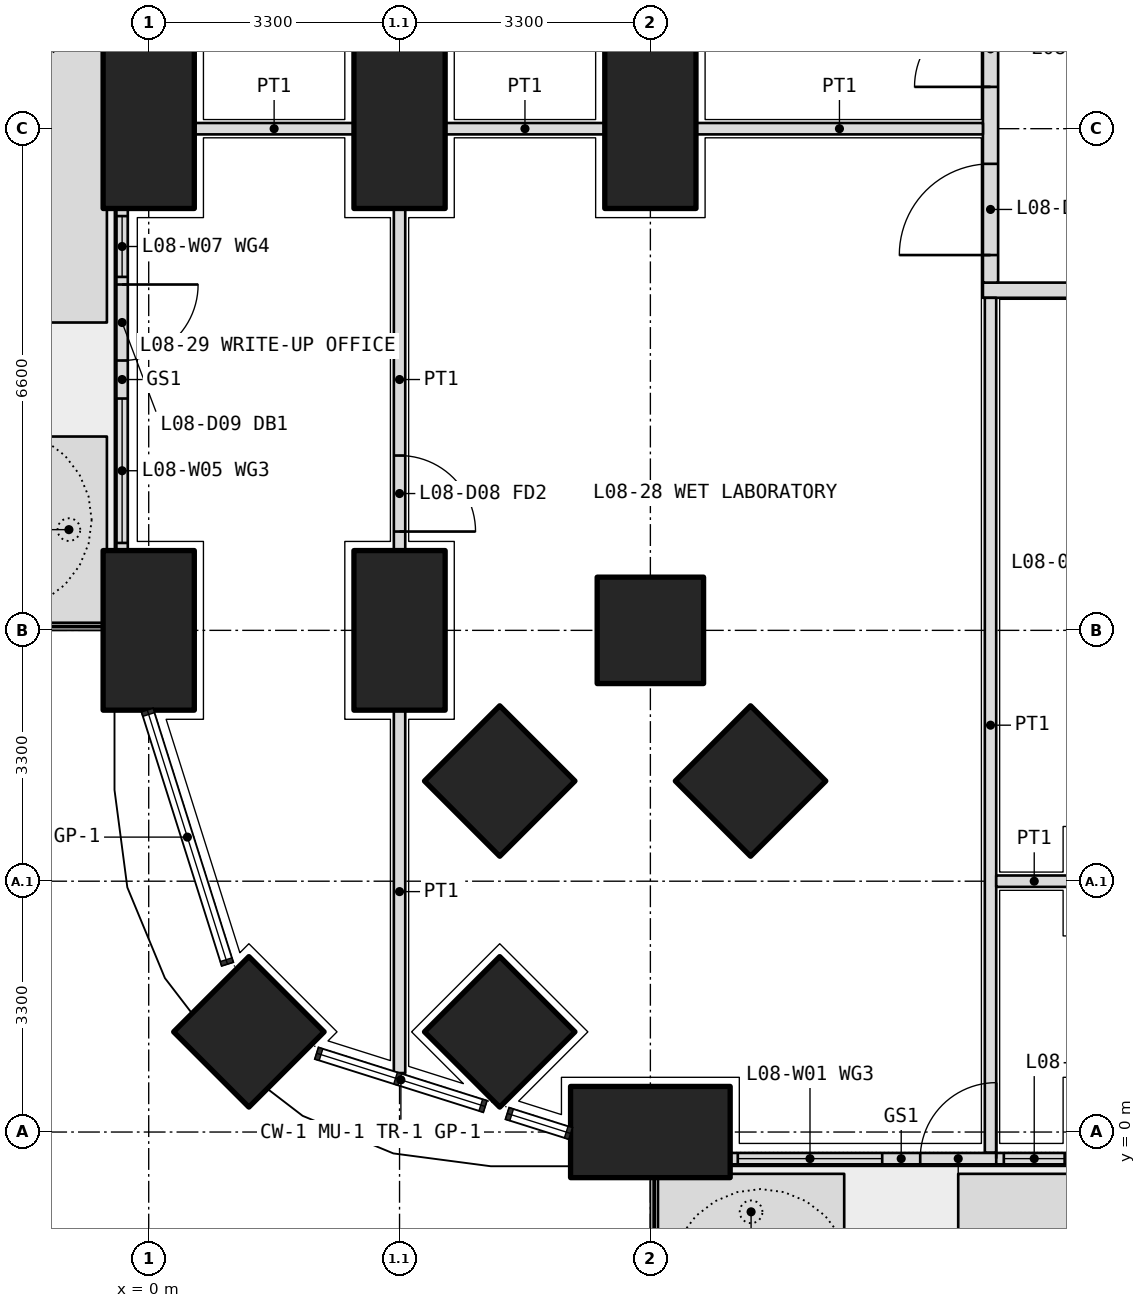
"""IFC4 building model, lengths in metres.
Left out: names, types, materials, properties, quantities, classifications, styles, units other than length and angle.
Written with IfcOpenShell. Run it as: python <this file> out.ifc"""

import sys

from ifc_helpers import new_model, si_unit, direction, frame, frame_2d, origin, origin_2d, place, context, subcontext, project, spatial, polyline, rectangle, outline, extrude, element, fill, save


model = new_model("IFC4")
c1 = context("Model", 3, precision=1e-05, world=origin(), true_north=direction((0.0, 1.0)))
c2 = subcontext(c1, "Body", "Model", "MODEL_VIEW")
j1 = project(units=[si_unit("LENGTHUNIT", "METRE"), si_unit("PLANEANGLEUNIT", "RADIAN")], contexts=[c1])
p1 = place(None, origin())
s1 = spatial("IfcSite", under=j1, at=p1, CompositionType="ELEMENT")
p2 = place(p1, origin())
s2 = spatial("IfcBuilding", under=s1, at=p2, CompositionType="ELEMENT")
p3 = place(p2, frame((0.0, 0.0, 38.1)))
s3 = spatial("IfcBuildingStorey", under=s2, at=p3, CompositionType="ELEMENT", Elevation=38.1)
p4 = place(p3, frame((1.318, 1.318, 0.0), z_axis=(0.0, 0.0, 1.0), x_axis=(0.707106781187, 0.707106781187, 0.0)))
e1 = element("IfcColumn", 1, at=p4, inside=s3, PredefinedType="COLUMN", context=c2, shape_type="SweptSolid", body=[
    extrude(rectangle(XDim=1.4, YDim=1.4, at=origin_2d()), origin(), (0.0, 0.0, 1.0), 4.2),
])
for number, where, z_axis, x_axis in (
    (2, (6.6, 0.0, 0.0), (0.0, 0.0, 1.0), (1.0, 0.0, 0.0)),
    (3, (0.0, 6.6, 0.0), (0.0, 0.0, 1.0), (0.0, 1.0, 0.0)),
    (4, (0.0, 13.2, 0.0), (0.0, 0.0, 1.0), (0.0, 1.0, 0.0)),
):
    element("IfcColumn", number, at=place(p3, frame(where, z_axis=z_axis, x_axis=x_axis)), inside=s3, PredefinedType="COLUMN", context=c2, shape_type="SweptSolid", body=[
        extrude(rectangle(XDim=2.1, YDim=1.2, at=origin_2d()), origin(), (0.0, 0.0, 1.0), 4.2),
    ])
for number, where, z_axis, x_axis in (
    (5, (6.6, 6.6, 0.0), (0.0, 0.0, 1.0), (1.0, 0.0, 0.0)),
    (6, (4.618, 1.318, 0.0), (0.0, 0.0, 1.0), (0.707, 0.707, 0.0)),
):
    element("IfcColumn", number, at=place(p3, frame(where, z_axis=z_axis, x_axis=x_axis)), inside=s3, PredefinedType="COLUMN", context=c2, shape_type="SweptSolid", body=[
        extrude(rectangle(XDim=1.4, YDim=1.4, at=origin_2d()), origin(), (0.0, 0.0, 1.0), 4.2),
    ])
for number, where, z_axis, x_axis in (
    (7, (3.3, 6.6, 0.0), (0.0, 0.0, 1.0), (0.0, 1.0, 0.0)),
    (8, (3.3, 13.2, 0.0), (0.0, 0.0, 1.0), (0.0, 1.0, 0.0)),
):
    element("IfcColumn", number, at=place(p3, frame(where, z_axis=z_axis, x_axis=x_axis)), inside=s3, PredefinedType="COLUMN", context=c2, shape_type="SweptSolid", body=[
        extrude(rectangle(XDim=2.1, YDim=1.2, at=origin_2d()), origin(), (0.0, 0.0, 1.0), 4.2),
    ])
for number, where, z_axis, x_axis in (
    (9, (4.618, 4.618, 0.0), (0.0, 0.0, 1.0), (0.707, 0.707, 0.0)),
    (10, (7.918, 4.618, 0.0), (0.0, 0.0, 1.0), (0.707, 0.707, 0.0)),
):
    element("IfcColumn", number, at=place(p3, frame(where, z_axis=z_axis, x_axis=x_axis)), inside=s3, PredefinedType="COLUMN", context=c2, shape_type="SweptSolid", body=[
        extrude(rectangle(XDim=1.4, YDim=1.4, at=origin_2d()), origin(), (0.0, 0.0, 1.0), 4.2),
    ])
p5 = place(p3, frame((6.6, 13.2, 0.0), z_axis=(0.0, 0.0, 1.0), x_axis=(0.0, 1.0, 0.0)))
e11 = element("IfcColumn", 11, at=p5, inside=s3, PredefinedType="COLUMN", context=c2, shape_type="SweptSolid", body=[
    extrude(rectangle(XDim=2.1, YDim=1.2, at=origin_2d()), origin(), (0.0, 0.0, 1.0), 4.2),
])
p6 = place(p3, origin())
e12 = element("IfcWall", 12, at=p6, inside=s3, PredefinedType="USERDEFINED", context=c2, shape_type="SweptSolid", body=[
    extrude(outline(polyline([(6.7, -1.55), (9.15, -1.55), (9.15, -0.55), (6.7, -0.55), (6.7, -1.55)]), holes=[polyline([(6.85, -1.4), (9.0, -1.4), (9.0, -0.7), (6.85, -0.7), (6.85, -1.4)])]), origin(), (0.0, 0.0, 1.0), 1.05),
])
p7 = place(p3, origin())
e13 = element("IfcWall", 13, at=p7, inside=s3, PredefinedType="USERDEFINED", context=c2, shape_type="SweptSolid", body=[
    extrude(outline(polyline([(10.65, -1.55), (19.7, -1.55), (19.7, -0.55), (10.65, -0.55), (10.65, -1.55)]), holes=[polyline([(10.8, -1.4), (19.55, -1.4), (19.55, -0.7), (10.8, -0.7), (10.8, -1.4)])]), origin(), (0.0, 0.0, 1.0), 1.05),
])
p8 = place(p3, origin())
e14 = element("IfcWall", 14, at=p8, inside=s3, PredefinedType="USERDEFINED", context=c2, shape_type="SweptSolid", body=[
    extrude(outline(polyline([(-1.55, 6.7), (-0.55, 6.7), (-0.55, 9.15), (-1.55, 9.15), (-1.55, 6.7)]), holes=[polyline([(-1.4, 6.85), (-0.7, 6.85), (-0.7, 9.0), (-1.4, 9.0), (-1.4, 6.85)])]), origin(), (0.0, 0.0, 1.0), 1.05),
])
p9 = place(p3, origin())
e15 = element("IfcWall", 15, at=p9, inside=s3, PredefinedType="USERDEFINED", context=c2, shape_type="SweptSolid", body=[
    extrude(outline(polyline([(-1.55, 10.65), (-0.55, 10.65), (-0.55, 19.7), (-1.55, 19.7), (-1.55, 10.65)]), holes=[polyline([(-1.4, 10.8), (-0.7, 10.8), (-0.7, 19.55), (-1.4, 19.55), (-1.4, 10.8)])]), origin(), (0.0, 0.0, 1.0), 1.05),
])
p10 = place(p3, frame((7.65, -0.35, 0.0), z_axis=(0.0, 0.0, 1.0), x_axis=(1.0, 0.0, 0.0)))
e16 = element("IfcWall", 16, at=p10, inside=s3, PredefinedType="SOLIDWALL", context=c2, shape_type="SweptSolid", body=[
    extrude(rectangle(XDim=4.5, YDim=0.15, at=frame_2d((2.25, 0.0))), origin(), (0.0, 0.0, 1.0), 2.7),
])
p11 = place(p10, frame((2.5, 0.0, 0.0)))
e17 = element("IfcOpeningElement", 17, at=p11, cuts=e16, PredefinedType="OPENING", context=c2, shape_type="SweptSolid", body=[
    extrude(rectangle(XDim=1.0, YDim=2.4, at=frame_2d((0.5, 1.2))), frame((0.0, 0.085, 0.0), z_axis=(0.0, -1.0, 0.0), x_axis=(1.0, 0.0, 0.0)), (0.0, 0.0, 1.0), 0.17),
])
p12 = place(p10, frame((0.1, 0.0, 0.1)))
e18 = element("IfcOpeningElement", 18, at=p12, cuts=e16, PredefinedType="OPENING", context=c2, shape_type="SweptSolid", body=[
    extrude(rectangle(XDim=1.9, YDim=2.3, at=frame_2d((0.95, 1.15))), frame((0.0, 0.085, 0.0), z_axis=(0.0, -1.0, 0.0), x_axis=(1.0, 0.0, 0.0)), (0.0, 0.0, 1.0), 0.17),
])
p13 = place(p10, frame((3.6, 0.0, 0.1)))
e19 = element("IfcOpeningElement", 19, at=p13, cuts=e16, PredefinedType="OPENING", context=c2, shape_type="SweptSolid", body=[
    extrude(rectangle(XDim=0.8, YDim=2.3, at=frame_2d((0.4, 1.15))), frame((0.0, 0.085, 0.0), z_axis=(0.0, -1.0, 0.0), x_axis=(1.0, 0.0, 0.0)), (0.0, 0.0, 1.0), 0.17),
])
p14 = place(p3, frame((-0.35, 12.15, 0.0), z_axis=(0.0, 0.0, 1.0), x_axis=(0.0, -1.0, 0.0)))
e20 = element("IfcWall", 20, at=p14, inside=s3, PredefinedType="SOLIDWALL", context=c2, shape_type="SweptSolid", body=[
    extrude(rectangle(XDim=4.5, YDim=0.15, at=frame_2d((2.25, 0.0))), origin(), (0.0, 0.0, 1.0), 2.7),
])
p15 = place(p14, frame((1.0, 0.0, 0.0)))
e21 = element("IfcOpeningElement", 21, at=p15, cuts=e20, PredefinedType="OPENING", context=c2, shape_type="SweptSolid", body=[
    extrude(rectangle(XDim=1.0, YDim=2.4, at=frame_2d((0.5, 1.2))), frame((0.0, 0.085, 0.0), z_axis=(0.0, -1.0, 0.0), x_axis=(1.0, 0.0, 0.0)), (0.0, 0.0, 1.0), 0.17),
])
p16 = place(p14, frame((0.1, 0.0, 0.1)))
e22 = element("IfcOpeningElement", 22, at=p16, cuts=e20, PredefinedType="OPENING", context=c2, shape_type="SweptSolid", body=[
    extrude(rectangle(XDim=0.8, YDim=2.3, at=frame_2d((0.4, 1.15))), frame((0.0, 0.085, 0.0), z_axis=(0.0, -1.0, 0.0), x_axis=(1.0, 0.0, 0.0)), (0.0, 0.0, 1.0), 0.17),
])
p17 = place(p14, frame((2.5, 0.0, 0.1)))
e23 = element("IfcOpeningElement", 23, at=p17, cuts=e20, PredefinedType="OPENING", context=c2, shape_type="SweptSolid", body=[
    extrude(rectangle(XDim=1.9, YDim=2.3, at=frame_2d((0.95, 1.15))), frame((0.0, 0.085, 0.0), z_axis=(0.0, -1.0, 0.0), x_axis=(1.0, 0.0, 0.0)), (0.0, 0.0, 1.0), 0.17),
])
p18 = place(p3, frame((10.975, 11.075, 0.0), z_axis=(0.0, 0.0, 1.0), x_axis=(1.0, 0.0, 0.0)))
e24 = element("IfcWall", 24, at=p18, inside=s3, PredefinedType="PARTITIONING", context=c2, shape_type="SweptSolid", body=[
    extrude(rectangle(XDim=30.85, YDim=0.2, at=frame_2d((15.425, 0.0))), origin(), (0.0, 0.0, 1.0), 2.85),
])
p19 = place(p18, frame((2.312, 0.0, 0.0)))
e25 = element("IfcOpeningElement", 25, at=p19, cuts=e24, PredefinedType="OPENING", context=c2, shape_type="SweptSolid", body=[
    extrude(rectangle(XDim=1.0, YDim=2.1, at=frame_2d((0.5, 1.05))), frame((0.0, 0.11, 0.0), z_axis=(0.0, -1.0, 0.0), x_axis=(1.0, 0.0, 0.0)), (0.0, 0.0, 1.0), 0.22),
])
p20 = place(p18, frame((8.325, 0.0, 0.0)))
e26 = element("IfcOpeningElement", 26, at=p20, cuts=e24, PredefinedType="OPENING", context=c2, shape_type="SweptSolid", body=[
    extrude(rectangle(XDim=1.0, YDim=2.1, at=frame_2d((0.5, 1.05))), frame((0.0, 0.11, 0.0), z_axis=(0.0, -1.0, 0.0), x_axis=(1.0, 0.0, 0.0)), (0.0, 0.0, 1.0), 0.22),
])
p21 = place(p18, frame((13.175, 0.0, 0.0)))
e27 = element("IfcOpeningElement", 27, at=p21, cuts=e24, PredefinedType="OPENING", context=c2, shape_type="SweptSolid", body=[
    extrude(rectangle(XDim=1.2, YDim=2.1, at=frame_2d((0.6, 1.05))), frame((0.0, 0.11, 0.0), z_axis=(0.0, -1.0, 0.0), x_axis=(1.0, 0.0, 0.0)), (0.0, 0.0, 1.0), 0.22),
])
p22 = place(p18, frame((19.875, 0.0, 0.0)))
e28 = element("IfcOpeningElement", 28, at=p22, cuts=e24, PredefinedType="OPENING", context=c2, shape_type="SweptSolid", body=[
    extrude(rectangle(XDim=1.0, YDim=2.1, at=frame_2d((0.5, 1.05))), frame((0.0, 0.11, 0.0), z_axis=(0.0, -1.0, 0.0), x_axis=(1.0, 0.0, 0.0)), (0.0, 0.0, 1.0), 0.22),
])
p23 = place(p18, frame((27.538, 0.0, 0.0)))
e29 = element("IfcOpeningElement", 29, at=p23, cuts=e24, PredefinedType="OPENING", context=c2, shape_type="SweptSolid", body=[
    extrude(rectangle(XDim=1.0, YDim=2.1, at=frame_2d((0.5, 1.05))), frame((0.0, 0.11, 0.0), z_axis=(0.0, -1.0, 0.0), x_axis=(1.0, 0.0, 0.0)), (0.0, 0.0, 1.0), 0.22),
])
p24 = place(p3, frame((11.075, 11.175, 0.0), z_axis=(0.0, 0.0, 1.0), x_axis=(0.0, 1.0, 0.0)))
e30 = element("IfcWall", 30, at=p24, inside=s3, PredefinedType="PARTITIONING", context=c2, shape_type="SweptSolid", body=[
    extrude(rectangle(XDim=23.85, YDim=0.2, at=frame_2d((11.925, 0.0))), origin(), (0.0, 0.0, 1.0), 2.85),
])
p25 = place(p24, frame((0.363, 0.0, 0.0)))
e31 = element("IfcOpeningElement", 31, at=p25, cuts=e30, PredefinedType="OPENING", context=c2, shape_type="SweptSolid", body=[
    extrude(rectangle(XDim=1.2, YDim=2.1, at=frame_2d((0.6, 1.05))), frame((0.0, 0.11, 0.0), z_axis=(0.0, -1.0, 0.0), x_axis=(1.0, 0.0, 0.0)), (0.0, 0.0, 1.0), 0.22),
])
p26 = place(p24, frame((2.575, 0.0, 0.0)))
e32 = element("IfcOpeningElement", 32, at=p26, cuts=e30, PredefinedType="OPENING", context=c2, shape_type="SweptSolid", body=[
    extrude(rectangle(XDim=1.0, YDim=2.1, at=frame_2d((0.5, 1.05))), frame((0.0, 0.11, 0.0), z_axis=(0.0, -1.0, 0.0), x_axis=(1.0, 0.0, 0.0)), (0.0, 0.0, 1.0), 0.22),
])
p27 = place(p24, frame((5.625, 0.0, 0.0)))
e33 = element("IfcOpeningElement", 33, at=p27, cuts=e30, PredefinedType="OPENING", context=c2, shape_type="SweptSolid", body=[
    extrude(rectangle(XDim=0.9, YDim=2.1, at=frame_2d((0.45, 1.05))), frame((0.0, 0.11, 0.0), z_axis=(0.0, -1.0, 0.0), x_axis=(1.0, 0.0, 0.0)), (0.0, 0.0, 1.0), 0.22),
])
p28 = place(p24, frame((9.425, 0.0, 0.0)))
e34 = element("IfcOpeningElement", 34, at=p28, cuts=e30, PredefinedType="OPENING", context=c2, shape_type="SweptSolid", body=[
    extrude(rectangle(XDim=0.9, YDim=2.1, at=frame_2d((0.45, 1.05))), frame((0.0, 0.11, 0.0), z_axis=(0.0, -1.0, 0.0), x_axis=(1.0, 0.0, 0.0)), (0.0, 0.0, 1.0), 0.22),
])
p29 = place(p24, frame((12.975, 0.0, 0.0)))
e35 = element("IfcOpeningElement", 35, at=p29, cuts=e30, PredefinedType="OPENING", context=c2, shape_type="SweptSolid", body=[
    extrude(rectangle(XDim=1.0, YDim=2.1, at=frame_2d((0.5, 1.05))), frame((0.0, 0.11, 0.0), z_axis=(0.0, -1.0, 0.0), x_axis=(1.0, 0.0, 0.0)), (0.0, 0.0, 1.0), 0.22),
])
p30 = place(p24, frame((16.375, 0.0, 0.0)))
e36 = element("IfcOpeningElement", 36, at=p30, cuts=e30, PredefinedType="OPENING", context=c2, shape_type="SweptSolid", body=[
    extrude(rectangle(XDim=1.0, YDim=2.1, at=frame_2d((0.5, 1.05))), frame((0.0, 0.11, 0.0), z_axis=(0.0, -1.0, 0.0), x_axis=(1.0, 0.0, 0.0)), (0.0, 0.0, 1.0), 0.22),
])
p31 = place(p24, frame((19.675, 0.0, 0.0)))
e37 = element("IfcOpeningElement", 37, at=p31, cuts=e30, PredefinedType="OPENING", context=c2, shape_type="SweptSolid", body=[
    extrude(rectangle(XDim=1.0, YDim=2.1, at=frame_2d((0.5, 1.05))), frame((0.0, 0.11, 0.0), z_axis=(0.0, -1.0, 0.0), x_axis=(1.0, 0.0, 0.0)), (0.0, 0.0, 1.0), 0.22),
])
p32 = place(p24, frame((22.387, 0.0, 0.0)))
e38 = element("IfcOpeningElement", 38, at=p32, cuts=e30, PredefinedType="OPENING", context=c2, shape_type="SweptSolid", body=[
    extrude(rectangle(XDim=1.0, YDim=2.1, at=frame_2d((0.5, 1.05))), frame((0.0, 0.11, 0.0), z_axis=(0.0, -1.0, 0.0), x_axis=(1.0, 0.0, 0.0)), (0.0, 0.0, 1.0), 0.22),
])
p33 = place(p3, frame((11.075, -0.27, 0.0), z_axis=(0.0, 0.0, 1.0), x_axis=(0.0, 1.0, 0.0)))
e39 = element("IfcWall", 39, at=p33, inside=s3, PredefinedType="PARTITIONING", context=c2, shape_type="SweptSolid", body=[
    extrude(rectangle(XDim=11.245, YDim=0.15, at=frame_2d((5.623, 0.0))), origin(), (0.0, 0.0, 1.0), 2.7),
])
p34 = place(p3, frame((11.15, 3.3, 0.0), z_axis=(0.0, 0.0, 1.0), x_axis=(1.0, 0.0, 0.0)))
e40 = element("IfcWall", 40, at=p34, inside=s3, PredefinedType="PARTITIONING", context=c2, shape_type="SweptSolid", body=[
    extrude(rectangle(XDim=1.0, YDim=0.15, at=frame_2d((0.5, 0.0))), origin(), (0.0, 0.0, 1.0), 3.9),
])
p35 = place(p3, frame((3.3, 12.15, 0.0), z_axis=(0.0, 0.0, 1.0), x_axis=(0.0, -1.0, 0.0)))
e41 = element("IfcWall", 41, at=p35, inside=s3, PredefinedType="PARTITIONING", context=c2, shape_type="SweptSolid", body=[
    extrude(rectangle(XDim=4.5, YDim=0.15, at=frame_2d((2.25, 0.0))), origin(), (0.0, 0.0, 1.0), 3.9),
])
p36 = place(p35, frame((3.25, 0.0, 0.0)))
e42 = element("IfcOpeningElement", 42, at=p36, cuts=e41, PredefinedType="OPENING", context=c2, shape_type="SweptSolid", body=[
    extrude(rectangle(XDim=1.0, YDim=2.1, at=frame_2d((0.5, 1.05))), frame((0.0, 0.085, 0.0), z_axis=(0.0, -1.0, 0.0), x_axis=(1.0, 0.0, 0.0)), (0.0, 0.0, 1.0), 0.17),
])
p37 = place(p3, frame((3.3, 5.55, 0.0), z_axis=(0.0, 0.0, 1.0), x_axis=(0.0, -1.0, 0.0)))
e43 = element("IfcWall", 43, at=p37, inside=s3, PredefinedType="PARTITIONING", context=c2, shape_type="SweptSolid", body=[
    extrude(rectangle(XDim=4.774, YDim=0.15, at=frame_2d((2.387, 0.0))), origin(), (0.0, 0.0, 1.0), 2.7),
])
p38 = place(p3, frame((0.6, 13.2, 0.0), z_axis=(0.0, 0.0, 1.0), x_axis=(1.0, 0.0, 0.0)))
e44 = element("IfcWall", 44, at=p38, inside=s3, PredefinedType="PARTITIONING", context=c2, shape_type="SweptSolid", body=[
    extrude(rectangle(XDim=2.1, YDim=0.15, at=frame_2d((1.05, 0.0))), origin(), (0.0, 0.0, 1.0), 2.85),
])
p39 = place(p3, frame((3.9, 13.2, 0.0), z_axis=(0.0, 0.0, 1.0), x_axis=(1.0, 0.0, 0.0)))
e45 = element("IfcWall", 45, at=p39, inside=s3, PredefinedType="PARTITIONING", context=c2, shape_type="SweptSolid", body=[
    extrude(rectangle(XDim=2.1, YDim=0.15, at=frame_2d((1.05, 0.0))), origin(), (0.0, 0.0, 1.0), 2.85),
])
p40 = place(p3, frame((7.2, 13.2, 0.0), z_axis=(0.0, 0.0, 1.0), x_axis=(1.0, 0.0, 0.0)))
e46 = element("IfcWall", 46, at=p40, inside=s3, PredefinedType="PARTITIONING", context=c2, shape_type="SweptSolid", body=[
    extrude(rectangle(XDim=3.775, YDim=0.15, at=frame_2d((1.888, 0.0))), origin(), (0.0, 0.0, 1.0), 2.85),
])
p41 = place(p11, origin())
e47 = element("IfcDoor", 47, at=p41, inside=s3, OperationType="SINGLE_SWING_RIGHT", PredefinedType="DOOR", context=c2, shape_type="SweptSolid", body=[
    extrude(rectangle(XDim=1.0, YDim=2.4, at=frame_2d((0.5, 1.2))), frame((0.0, 0.025, 0.0), z_axis=(0.0, -1.0, 0.0), x_axis=(1.0, 0.0, 0.0)), (0.0, 0.0, 1.0), 0.05),
])
fill(e17, e47)
p42 = place(p12, origin())
e48 = element("IfcWindow", 48, at=p42, inside=s3, PartitioningType="SINGLE_PANEL", PredefinedType="WINDOW", context=c2, shape_type="SweptSolid", body=[
    extrude(rectangle(XDim=1.9, YDim=2.3, at=frame_2d((0.95, 1.15))), frame((0.0, 0.03, 0.0), z_axis=(0.0, -1.0, 0.0), x_axis=(1.0, 0.0, 0.0)), (0.0, 0.0, 1.0), 0.06),
])
fill(e18, e48)
p43 = place(p13, origin())
e49 = element("IfcWindow", 49, at=p43, inside=s3, PartitioningType="SINGLE_PANEL", PredefinedType="WINDOW", context=c2, shape_type="SweptSolid", body=[
    extrude(rectangle(XDim=0.8, YDim=2.3, at=frame_2d((0.4, 1.15))), frame((0.0, 0.03, 0.0), z_axis=(0.0, -1.0, 0.0), x_axis=(1.0, 0.0, 0.0)), (0.0, 0.0, 1.0), 0.06),
])
fill(e19, e49)
p44 = place(p15, origin())
e50 = element("IfcDoor", 50, at=p44, inside=s3, OperationType="SINGLE_SWING_LEFT", PredefinedType="DOOR", context=c2, shape_type="SweptSolid", body=[
    extrude(rectangle(XDim=1.0, YDim=2.4, at=frame_2d((0.5, 1.2))), frame((0.0, 0.025, 0.0), z_axis=(0.0, -1.0, 0.0), x_axis=(1.0, 0.0, 0.0)), (0.0, 0.0, 1.0), 0.05),
])
fill(e21, e50)
p45 = place(p16, origin())
e51 = element("IfcWindow", 51, at=p45, inside=s3, PartitioningType="SINGLE_PANEL", PredefinedType="WINDOW", context=c2, shape_type="SweptSolid", body=[
    extrude(rectangle(XDim=0.8, YDim=2.3, at=frame_2d((0.4, 1.15))), frame((0.0, 0.03, 0.0), z_axis=(0.0, -1.0, 0.0), x_axis=(1.0, 0.0, 0.0)), (0.0, 0.0, 1.0), 0.06),
])
fill(e22, e51)
p46 = place(p17, origin())
e52 = element("IfcWindow", 52, at=p46, inside=s3, PartitioningType="SINGLE_PANEL", PredefinedType="WINDOW", context=c2, shape_type="SweptSolid", body=[
    extrude(rectangle(XDim=1.9, YDim=2.3, at=frame_2d((0.95, 1.15))), frame((0.0, 0.03, 0.0), z_axis=(0.0, -1.0, 0.0), x_axis=(1.0, 0.0, 0.0)), (0.0, 0.0, 1.0), 0.06),
])
fill(e23, e52)
p47 = place(p25, origin())
e53 = element("IfcDoor", 53, at=p47, inside=s3, OperationType="DOUBLE_DOOR_SINGLE_SWING", PredefinedType="DOOR", context=c2, shape_type="SweptSolid", body=[
    extrude(rectangle(XDim=1.2, YDim=2.1, at=frame_2d((0.6, 1.05))), frame((0.0, 0.025, 0.0), z_axis=(0.0, -1.0, 0.0), x_axis=(1.0, 0.0, 0.0)), (0.0, 0.0, 1.0), 0.05),
])
fill(e31, e53)
p48 = place(p36, origin())
e54 = element("IfcDoor", 54, at=p48, inside=s3, OperationType="SINGLE_SWING_RIGHT", PredefinedType="DOOR", context=c2, shape_type="SweptSolid", body=[
    extrude(rectangle(XDim=1.0, YDim=2.1, at=frame_2d((0.5, 1.05))), frame((0.0, 0.025, 0.0), z_axis=(0.0, -1.0, 0.0), x_axis=(1.0, 0.0, 0.0)), (0.0, 0.0, 1.0), 0.05),
])
fill(e42, e54)
p49 = place(p26, origin())
e55 = element("IfcDoor", 55, at=p49, inside=s3, OperationType="SINGLE_SWING_LEFT", PredefinedType="DOOR", context=c2, shape_type="SweptSolid", body=[
    extrude(rectangle(XDim=1.0, YDim=2.1, at=frame_2d((0.5, 1.05))), frame((0.0, 0.025, 0.0), z_axis=(0.0, -1.0, 0.0), x_axis=(1.0, 0.0, 0.0)), (0.0, 0.0, 1.0), 0.05),
])
fill(e32, e55)
save(model, sys.argv[1])
